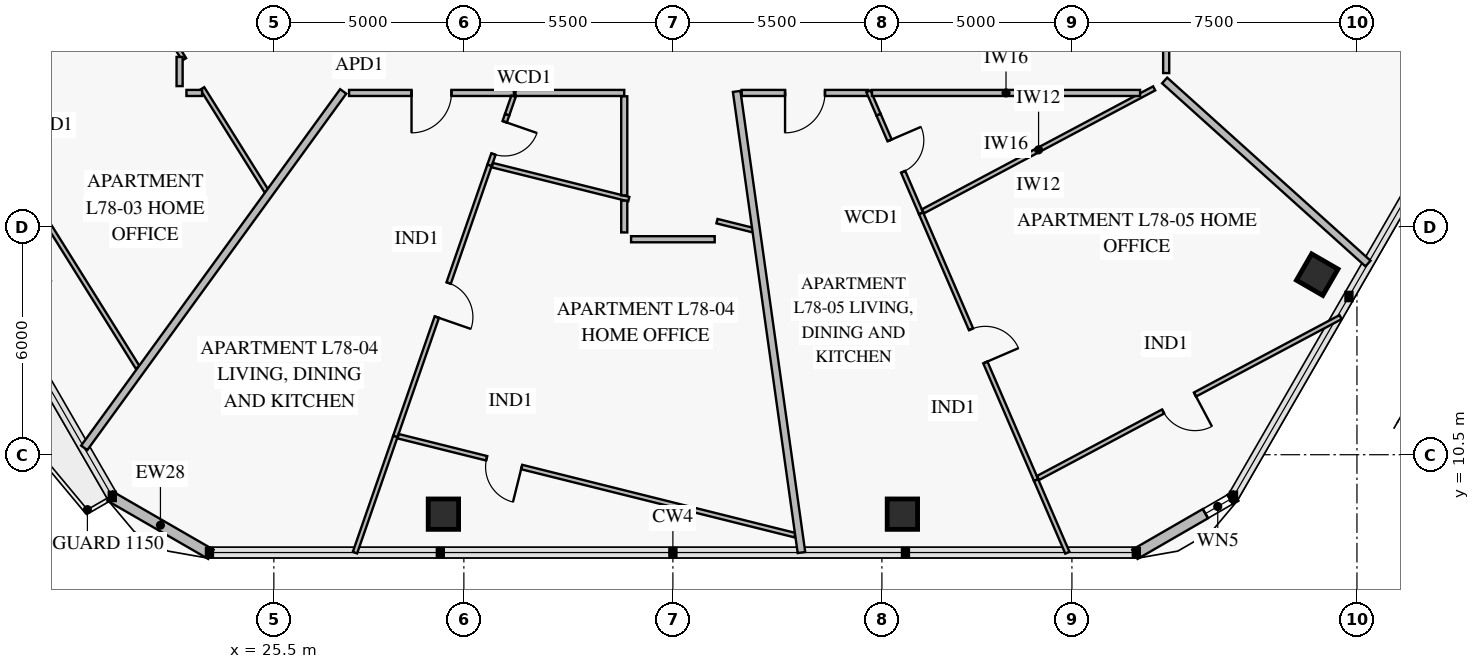
"""IFC4 building model, lengths in metres.
Left out: names, types, materials, properties, quantities, classifications, styles, units other than length and angle.
Written with IfcOpenShell. Run it as: python <this file> out.ifc"""

import sys

from ifc_helpers import new_model, si_unit, direction, frame, frame_2d, origin, origin_2d, place, context, subcontext, project, spatial, rectangle, extrude, element, fill, save


model = new_model("IFC4")
c1 = context("Model", 3, precision=1e-05, world=origin(), true_north=direction((0.0, 1.0)))
c2 = subcontext(c1, "Body", "Model", "MODEL_VIEW")
j1 = project(units=[si_unit("LENGTHUNIT", "METRE"), si_unit("PLANEANGLEUNIT", "RADIAN")], contexts=[c1])
p1 = place(None, origin())
s1 = spatial("IfcSite", under=j1, at=p1, CompositionType="ELEMENT")
p2 = place(p1, origin())
s2 = spatial("IfcBuilding", under=s1, at=p2, CompositionType="ELEMENT")
p3 = place(p2, frame((0.0, 0.0, 308.2)))
s3 = spatial("IfcBuildingStorey", under=s2, at=p3, CompositionType="ELEMENT", Elevation=308.2)
for number, where, z_axis, x_axis in (
    (1, (29.961, 8.936, 0.0), (0.0, 0.0, 1.0), (1.0, 0.0, 0.0)),
    (2, (42.039, 8.936, 0.0), (0.0, 0.0, 1.0), (1.0, 0.0, 0.0)),
    (3, (52.955, 15.238, 0.0), (0.0, 0.0, 1.0), (0.5, 0.866, 0.0)),
):
    element("IfcColumn", number, at=place(p3, frame(where, z_axis=z_axis, x_axis=x_axis)), inside=s3, PredefinedType="COLUMN", context=c2, shape_type="SweptSolid", body=[
        extrude(rectangle(XDim=0.8, YDim=0.8, at=origin_2d()), origin(), (0.0, 0.0, 1.0), 3.55),
    ])
p4 = place(p3, frame((50.811, 9.411, 0.0), z_axis=(0.0, 0.0, 1.0), x_axis=(-0.866023752521, -0.50000286006, 0.0)))
e4 = element("IfcWall", 4, at=p4, inside=s3, PredefinedType="SOLIDWALL", context=c2, shape_type="SweptSolid", body=[
    extrude(rectangle(XDim=3.065, YDim=0.28, at=frame_2d((1.532, 0.0))), origin(), (0.0, 0.0, 1.0), 3.55),
])
p5 = place(p4, frame((0.173, 0.0, 0.85)))
e5 = element("IfcOpeningElement", 5, at=p5, cuts=e4, PredefinedType="OPENING", context=c2, shape_type="SweptSolid", body=[
    extrude(rectangle(XDim=0.75, YDim=1.5, at=frame_2d((0.375, 0.75))), frame((0.0, 0.152, 0.0), z_axis=(0.0, -1.0, 0.0), x_axis=(1.0, 0.0, 0.0)), (0.0, 0.0, 1.0), 0.304),
])
p6 = place(p3, frame((23.843, 7.878, 0.0), z_axis=(0.0, 0.0, 1.0), x_axis=(-0.866023752521, 0.50000286006, 0.0)))
e6 = element("IfcWall", 6, at=p6, inside=s3, PredefinedType="SOLIDWALL", context=c2, shape_type="SweptSolid", body=[
    extrude(rectangle(XDim=3.065, YDim=0.28, at=frame_2d((1.532, 0.0))), origin(), (0.0, 0.0, 1.0), 3.55),
])
p7 = place(p3, frame((16.22, 21.915, 0.0), z_axis=(0.0, 0.0, 1.0), x_axis=(0.529909111027, -0.8480544405, 0.0)))
e7 = element("IfcWall", 7, at=p7, inside=s3, PredefinedType="PARTITIONING", context=c2, shape_type="SweptSolid", body=[
    extrude(rectangle(XDim=10.75, YDim=0.12, at=frame_2d((5.375, 0.0))), origin(), (0.0, 0.0, 1.0), 2.97),
])
p8 = place(p7, frame((4.815, 0.0, 0.0)))
e8 = element("IfcOpeningElement", 8, at=p8, cuts=e7, PredefinedType="OPENING", context=c2, shape_type="SweptSolid", body=[
    extrude(rectangle(XDim=0.95, YDim=2.1, at=frame_2d((0.475, 1.05))), frame((0.0, 0.072, 0.0), z_axis=(0.0, -1.0, 0.0), x_axis=(1.0, 0.0, 0.0)), (0.0, 0.0, 1.0), 0.144),
])
p9 = place(p3, frame((31.639, 19.45, 0.0), z_axis=(0.0, 0.0, 1.0), x_axis=(-0.328259686912, -0.944587517358, 0.0)))
e9 = element("IfcWall", 9, at=p9, inside=s3, PredefinedType="PARTITIONING", context=c2, shape_type="SweptSolid", body=[
    extrude(rectangle(XDim=1.415, YDim=0.12, at=frame_2d((0.708, 0.0))), origin(), (0.0, 0.0, 1.0), 3.55),
])
p10 = place(p9, frame((0.2, 0.0, 0.0)))
e10 = element("IfcOpeningElement", 10, at=p10, cuts=e9, PredefinedType="OPENING", context=c2, shape_type="SweptSolid", body=[
    extrude(rectangle(XDim=0.9, YDim=2.1, at=frame_2d((0.45, 1.05))), frame((0.0, 0.072, 0.0), z_axis=(0.0, -1.0, 0.0), x_axis=(1.0, 0.0, 0.0)), (0.0, 0.0, 1.0), 0.144),
])
p11 = place(p3, frame((31.175, 18.113, 0.0), z_axis=(0.0, 0.0, 1.0), x_axis=(-0.32822845585, -0.944598370087, 0.0)))
e11 = element("IfcWall", 11, at=p11, inside=s3, PredefinedType="PARTITIONING", context=c2, shape_type="SweptSolid", body=[
    extrude(rectangle(XDim=7.552, YDim=0.12, at=frame_2d((3.776, 0.0))), origin(), (0.0, 0.0, 1.0), 3.55),
])
p12 = place(p11, frame((3.276, 0.0, 0.0)))
e12 = element("IfcOpeningElement", 12, at=p12, cuts=e11, PredefinedType="OPENING", context=c2, shape_type="SweptSolid", body=[
    extrude(rectangle(XDim=0.95, YDim=2.1, at=frame_2d((0.475, 1.05))), frame((0.0, 0.072, 0.0), z_axis=(0.0, -1.0, 0.0), x_axis=(1.0, 0.0, 0.0)), (0.0, 0.0, 1.0), 0.144),
])
p13 = place(p3, frame((28.771, 10.987, 0.0), z_axis=(0.0, 0.0, 1.0), x_axis=(0.970295811895, -0.241921552202, 0.0)))
e13 = element("IfcWall", 13, at=p13, inside=s3, PredefinedType="PARTITIONING", context=c2, shape_type="SweptSolid", body=[
    extrude(rectangle(XDim=10.759, YDim=0.12, at=frame_2d((5.379, 0.0))), origin(), (0.0, 0.0, 1.0), 2.97),
])
p14 = place(p13, frame((2.4, 0.0, 0.0)))
e14 = element("IfcOpeningElement", 14, at=p14, cuts=e13, PredefinedType="OPENING", context=c2, shape_type="SweptSolid", body=[
    extrude(rectangle(XDim=0.95, YDim=2.1, at=frame_2d((0.475, 1.05))), frame((0.0, 0.072, 0.0), z_axis=(0.0, -1.0, 0.0), x_axis=(1.0, 0.0, 0.0)), (0.0, 0.0, 1.0), 0.144),
])
p15 = place(p3, frame((27.479, 20.02, 0.0), z_axis=(0.0, 0.0, 1.0), x_axis=(1.0, 0.0, 0.0)))
e15 = element("IfcWall", 15, at=p15, inside=s3, PredefinedType="PARTITIONING", context=c2, shape_type="SweptSolid", body=[
    extrude(rectangle(XDim=4.337, YDim=0.16, at=frame_2d((2.168, 0.0))), origin(), (0.0, 0.0, 1.0), 3.55),
])
p16 = place(p15, frame((1.644, 0.0, 0.0)))
e16 = element("IfcOpeningElement", 16, at=p16, cuts=e15, PredefinedType="OPENING", context=c2, shape_type="SweptSolid", body=[
    extrude(rectangle(XDim=1.05, YDim=2.15, at=frame_2d((0.525, 1.075))), frame((0.0, 0.092, 0.0), z_axis=(0.0, -1.0, 0.0), x_axis=(1.0, 0.0, 0.0)), (0.0, 0.0, 1.0), 0.184),
])
p17 = place(p3, frame((41.41, 19.45, 0.0), z_axis=(0.0, 0.0, 1.0), x_axis=(0.395844398044, -0.918317598948, 0.0)))
e17 = element("IfcWall", 17, at=p17, inside=s3, PredefinedType="PARTITIONING", context=c2, shape_type="SweptSolid", body=[
    extrude(rectangle(XDim=2.83, YDim=0.12, at=frame_2d((1.415, 0.0))), origin(), (0.0, 0.0, 1.0), 3.55),
])
p18 = place(p17, frame((0.739, 0.0, 0.0)))
e18 = element("IfcOpeningElement", 18, at=p18, cuts=e17, PredefinedType="OPENING", context=c2, shape_type="SweptSolid", body=[
    extrude(rectangle(XDim=0.9, YDim=2.1, at=frame_2d((0.45, 1.05))), frame((0.0, 0.072, 0.0), z_axis=(0.0, -1.0, 0.0), x_axis=(1.0, 0.0, 0.0)), (0.0, 0.0, 1.0), 0.144),
])
p19 = place(p3, frame((42.531, 16.851, 0.0), z_axis=(0.0, 0.0, 1.0), x_axis=(0.39587300587, -0.918305266904, 0.0)))
e19 = element("IfcWall", 19, at=p19, inside=s3, PredefinedType="PARTITIONING", context=c2, shape_type="SweptSolid", body=[
    extrude(rectangle(XDim=7.643, YDim=0.12, at=frame_2d((3.821, 0.0))), origin(), (0.0, 0.0, 1.0), 2.97),
])
p20 = place(p19, frame((3.322, 0.0, 0.0)))
e20 = element("IfcOpeningElement", 20, at=p20, cuts=e19, PredefinedType="OPENING", context=c2, shape_type="SweptSolid", body=[
    extrude(rectangle(XDim=0.95, YDim=2.1, at=frame_2d((0.475, 1.05))), frame((0.0, 0.072, 0.0), z_axis=(0.0, -1.0, 0.0), x_axis=(1.0, 0.0, 0.0)), (0.0, 0.0, 1.0), 0.144),
])
p21 = place(p3, frame((45.607, 9.887, 0.0), z_axis=(0.0, 0.0, 1.0), x_axis=(0.882942125216, 0.469481845782, 0.0)))
e21 = element("IfcWall", 21, at=p21, inside=s3, PredefinedType="PARTITIONING", context=c2, shape_type="SweptSolid", body=[
    extrude(rectangle(XDim=9.017, YDim=0.12, at=frame_2d((4.508, 0.0))), origin(), (0.0, 0.0, 1.0), 3.55),
])
p22 = place(p21, frame((3.729, 0.0, 0.0)))
e22 = element("IfcOpeningElement", 22, at=p22, cuts=e21, PredefinedType="OPENING", context=c2, shape_type="SweptSolid", body=[
    extrude(rectangle(XDim=0.95, YDim=2.1, at=frame_2d((0.475, 1.05))), frame((0.0, 0.072, 0.0), z_axis=(0.0, -1.0, 0.0), x_axis=(1.0, 0.0, 0.0)), (0.0, 0.0, 1.0), 0.144),
])
p23 = place(p3, frame((37.811, 20.02, 0.0), z_axis=(0.0, 0.0, 1.0), x_axis=(1.0, 0.0, 0.0)))
e23 = element("IfcWall", 23, at=p23, inside=s3, PredefinedType="PARTITIONING", context=c2, shape_type="SweptSolid", body=[
    extrude(rectangle(XDim=3.332, YDim=0.16, at=frame_2d((1.666, 0.0))), origin(), (0.0, 0.0, 1.0), 3.0),
])
p24 = place(p23, frame((1.141, 0.0, 0.0)))
e24 = element("IfcOpeningElement", 24, at=p24, cuts=e23, PredefinedType="OPENING", context=c2, shape_type="SweptSolid", body=[
    extrude(rectangle(XDim=1.05, YDim=2.15, at=frame_2d((0.525, 1.075))), frame((0.0, 0.092, 0.0), z_axis=(0.0, -1.0, 0.0), x_axis=(1.0, 0.0, 0.0)), (0.0, 0.0, 1.0), 0.184),
])
p25 = place(p3, frame((20.998, 24.333, 0.0), z_axis=(0.0, 0.0, 1.0), x_axis=(0.529874080143, -0.848076328636, 0.0)))
e25 = element("IfcWall", 25, at=p25, inside=s3, PredefinedType="PARTITIONING", context=c2, shape_type="SweptSolid", body=[
    extrude(rectangle(XDim=4.043, YDim=0.12, at=frame_2d((2.021, 0.0))), origin(), (0.0, 0.0, 1.0), 3.55),
])
p26 = place(p3, frame((23.617, 20.14, 0.0), z_axis=(0.0, 0.0, 1.0), x_axis=(0.529937667558, -0.848036596205, 0.0)))
e26 = element("IfcWall", 26, at=p26, inside=s3, PredefinedType="PARTITIONING", context=c2, shape_type="SweptSolid", body=[
    extrude(rectangle(XDim=3.223, YDim=0.12, at=frame_2d((1.612, 0.0))), origin(), (0.0, 0.0, 1.0), 3.0),
])
p27 = place(p3, frame((27.325, 20.06, 0.0), z_axis=(0.0, 0.0, 1.0), x_axis=(-0.587784737056, -0.809017368716, 0.0)))
e27 = element("IfcWall", 27, at=p27, inside=s3, PredefinedType="PARTITIONING", context=c2, shape_type="SweptSolid", body=[
    extrude(rectangle(XDim=11.594, YDim=0.2, at=frame_2d((5.797, 0.0))), origin(), (0.0, 0.0, 1.0), 2.97),
])
p28 = place(p3, frame((31.807, 19.932, 0.0), z_axis=(0.0, 0.0, 1.0), x_axis=(-0.328260778463, -0.944587138025, 0.0)))
e28 = element("IfcWall", 28, at=p28, inside=s3, PredefinedType="PARTITIONING", context=c2, shape_type="SweptSolid", body=[
    extrude(rectangle(XDim=0.51, YDim=0.12, at=frame_2d((0.255, 0.0))), origin(), (0.0, 0.0, 1.0), 3.55),
])
p29 = place(p3, frame((28.696, 10.979, 0.0), z_axis=(0.0, 0.0, 1.0), x_axis=(-0.328219248411, -0.944601569432, 0.0)))
e29 = element("IfcWall", 29, at=p29, inside=s3, PredefinedType="PARTITIONING", context=c2, shape_type="SweptSolid", body=[
    extrude(rectangle(XDim=3.236, YDim=0.12, at=frame_2d((1.618, 0.0))), origin(), (0.0, 0.0, 1.0), 2.97),
])
p30 = place(p3, frame((31.249, 18.12, 0.0), z_axis=(0.0, 0.0, 1.0), x_axis=(0.970297526706, -0.241914674356, 0.0)))
e30 = element("IfcWall", 30, at=p30, inside=s3, PredefinedType="PARTITIONING", context=c2, shape_type="SweptSolid", body=[
    extrude(rectangle(XDim=3.701, YDim=0.12, at=frame_2d((1.85, 0.0))), origin(), (0.0, 0.0, 1.0), 3.0),
])
p31 = place(p3, frame((37.16, 16.646, 0.0), z_axis=(0.0, 0.0, 1.0), x_axis=(0.970296375277, -0.241919292584, 0.0)))
e31 = element("IfcWall", 31, at=p31, inside=s3, PredefinedType="PARTITIONING", context=c2, shape_type="SweptSolid", body=[
    extrude(rectangle(XDim=1.025, YDim=0.12, at=frame_2d((0.513, 0.0))), origin(), (0.0, 0.0, 1.0), 3.55),
])
p32 = place(p3, frame((37.678, 20.06, 0.0), z_axis=(0.0, 0.0, 1.0), x_axis=(0.139169963781, -0.990268509638, 0.0)))
e32 = element("IfcWall", 32, at=p32, inside=s3, PredefinedType="PARTITIONING", context=c2, shape_type="SweptSolid", body=[
    extrude(rectangle(XDim=12.253, YDim=0.2, at=frame_2d((6.127, 0.0))), origin(), (0.0, 0.0, 1.0), 2.97),
])
p33 = place(p3, frame((41.146, 20.063, 0.0), z_axis=(0.0, 0.0, 1.0), x_axis=(0.395728306554, -0.918367631938, 0.0)))
e33 = element("IfcWall", 33, at=p33, inside=s3, PredefinedType="PARTITIONING", context=c2, shape_type="SweptSolid", body=[
    extrude(rectangle(XDim=0.667, YDim=0.12, at=frame_2d((0.334, 0.0))), origin(), (0.0, 0.0, 1.0), 3.55),
])
p34 = place(p3, frame((45.556, 9.832, 0.0), z_axis=(0.0, 0.0, 1.0), x_axis=(0.39587198398, -0.918305707431, 0.0)))
e34 = element("IfcWall", 34, at=p34, inside=s3, PredefinedType="PARTITIONING", context=c2, shape_type="SweptSolid", body=[
    extrude(rectangle(XDim=2.081, YDim=0.12, at=frame_2d((1.041, 0.0))), origin(), (0.0, 0.0, 1.0), 3.55),
])
p35 = place(p3, frame((42.581, 16.906, 0.0), z_axis=(0.0, 0.0, 1.0), x_axis=(0.882955532535, 0.469456630122, 0.0)))
e35 = element("IfcWall", 35, at=p35, inside=s3, PredefinedType="PARTITIONING", context=c2, shape_type="SweptSolid", body=[
    extrude(rectangle(XDim=6.889, YDim=0.12, at=frame_2d((3.445, 0.0))), origin(), (0.0, 0.0, 1.0), 3.0),
])
p36 = place(p3, frame((48.94, 20.349, 0.0), z_axis=(0.0, 0.0, 1.0), x_axis=(0.74315080538, -0.669123964944, 0.0)))
e36 = element("IfcWall", 36, at=p36, inside=s3, PredefinedType="PARTITIONING", context=c2, shape_type="SweptSolid", body=[
    extrude(rectangle(XDim=7.199, YDim=0.2, at=frame_2d((3.6, 0.0))), origin(), (0.0, 0.0, 1.0), 2.97),
])
p37 = place(p3, frame((23.02, 20.968, 0.0), z_axis=(0.0, 0.0, 1.0), x_axis=(0.0, -1.0, 0.0)))
e37 = element("IfcWall", 37, at=p37, inside=s3, PredefinedType="PARTITIONING", context=c2, shape_type="SweptSolid", body=[
    extrude(rectangle(XDim=0.768, YDim=0.16, at=frame_2d((0.384, 0.0))), origin(), (0.0, 0.0, 1.0), 3.55),
])
p38 = place(p3, frame((23.2, 20.02, 0.0), z_axis=(0.0, 0.0, 1.0), x_axis=(1.0, 0.0, 0.0)))
e38 = element("IfcWall", 38, at=p38, inside=s3, PredefinedType="PARTITIONING", context=c2, shape_type="SweptSolid", body=[
    extrude(rectangle(XDim=0.412, YDim=0.16, at=frame_2d((0.206, 0.0))), origin(), (0.0, 0.0, 1.0), 3.55),
])
p39 = place(p3, frame((31.859, 20.02, 0.0), z_axis=(0.0, 0.0, 1.0), x_axis=(1.0, 0.0, 0.0)))
e39 = element("IfcWall", 39, at=p39, inside=s3, PredefinedType="PARTITIONING", context=c2, shape_type="SweptSolid", body=[
    extrude(rectangle(XDim=2.861, YDim=0.16, at=frame_2d((1.431, 0.0))), origin(), (0.0, 0.0, 1.0), 3.0),
])
p40 = place(p3, frame((34.72, 19.932, 0.0), z_axis=(0.0, 0.0, 1.0), x_axis=(0.0, -1.0, 0.0)))
e40 = element("IfcWall", 40, at=p40, inside=s3, PredefinedType="PARTITIONING", context=c2, shape_type="SweptSolid", body=[
    extrude(rectangle(XDim=2.607, YDim=0.16, at=frame_2d((1.303, 0.0))), origin(), (0.0, 0.0, 1.0), 3.55),
])
p41 = place(p3, frame((34.9, 16.17, 0.0), z_axis=(0.0, 0.0, 1.0), x_axis=(1.0, 0.0, 0.0)))
e41 = element("IfcWall", 41, at=p41, inside=s3, PredefinedType="PARTITIONING", context=c2, shape_type="SweptSolid", body=[
    extrude(rectangle(XDim=2.2, YDim=0.16, at=frame_2d((1.1, 0.0))), origin(), (0.0, 0.0, 1.0), 3.55),
])
p42 = place(p3, frame((34.72, 17.185, 0.0), z_axis=(0.0, 0.0, 1.0), x_axis=(0.0, -1.0, 0.0)))
e42 = element("IfcWall", 42, at=p42, inside=s3, PredefinedType="PARTITIONING", context=c2, shape_type="SweptSolid", body=[
    extrude(rectangle(XDim=0.835, YDim=0.16, at=frame_2d((0.417, 0.0))), origin(), (0.0, 0.0, 1.0), 3.55),
])
p43 = place(p3, frame((41.238, 20.02, 0.0), z_axis=(0.0, 0.0, 1.0), x_axis=(1.0, 0.0, 0.0)))
e43 = element("IfcWall", 43, at=p43, inside=s3, PredefinedType="PARTITIONING", context=c2, shape_type="SweptSolid", body=[
    extrude(rectangle(XDim=7.055, YDim=0.16, at=frame_2d((3.527, 0.0))), origin(), (0.0, 0.0, 1.0), 3.0),
])
p44 = place(p3, frame((48.98, 20.543, 0.0), z_axis=(0.0, 0.0, 1.0), x_axis=(0.0, 1.0, 0.0)))
e44 = element("IfcWall", 44, at=p44, inside=s3, PredefinedType="PARTITIONING", context=c2, shape_type="SweptSolid", body=[
    extrude(rectangle(XDim=1.707, YDim=0.16, at=frame_2d((0.854, 0.0))), origin(), (0.0, 0.0, 1.0), 3.55),
])
p45 = place(p5, origin())
e45 = element("IfcWindow", 45, at=p45, inside=s3, PartitioningType="SINGLE_PANEL", PredefinedType="WINDOW", context=c2, shape_type="SweptSolid", body=[
    extrude(rectangle(XDim=0.75, YDim=1.5, at=frame_2d((0.375, 0.75))), frame((0.0, 0.03, 0.0), z_axis=(0.0, -1.0, 0.0), x_axis=(1.0, 0.0, 0.0)), (0.0, 0.0, 1.0), 0.06),
])
fill(e5, e45)
p46 = place(p10, origin())
e46 = element("IfcDoor", 46, at=p46, inside=s3, OperationType="SINGLE_SWING_LEFT", PredefinedType="DOOR", context=c2, shape_type="SweptSolid", body=[
    extrude(rectangle(XDim=0.9, YDim=2.1, at=frame_2d((0.45, 1.05))), frame((0.0, 0.025, 0.0), z_axis=(0.0, -1.0, 0.0), x_axis=(1.0, 0.0, 0.0)), (0.0, 0.0, 1.0), 0.05),
])
fill(e10, e46)
p47 = place(p12, origin())
e47 = element("IfcDoor", 47, at=p47, inside=s3, OperationType="SINGLE_SWING_RIGHT", PredefinedType="DOOR", context=c2, shape_type="SweptSolid", body=[
    extrude(rectangle(XDim=0.95, YDim=2.1, at=frame_2d((0.475, 1.05))), frame((0.0, 0.025, 0.0), z_axis=(0.0, -1.0, 0.0), x_axis=(1.0, 0.0, 0.0)), (0.0, 0.0, 1.0), 0.05),
])
fill(e12, e47)
p48 = place(p14, frame((0.95, 0.0, 0.0), z_axis=(0.0, 0.0, 1.0), x_axis=(-1.0, 0.0, 0.0)))
e48 = element("IfcDoor", 48, at=p48, inside=s3, OperationType="SINGLE_SWING_LEFT", PredefinedType="DOOR", context=c2, shape_type="SweptSolid", body=[
    extrude(rectangle(XDim=0.95, YDim=2.1, at=frame_2d((0.475, 1.05))), frame((0.0, 0.025, 0.0), z_axis=(0.0, -1.0, 0.0), x_axis=(1.0, 0.0, 0.0)), (0.0, 0.0, 1.0), 0.05),
])
fill(e14, e48)
p49 = place(p16, frame((1.05, 0.0, 0.0), z_axis=(0.0, 0.0, 1.0), x_axis=(-1.0, 0.0, 0.0)))
e49 = element("IfcDoor", 49, at=p49, inside=s3, OperationType="SINGLE_SWING_RIGHT", PredefinedType="DOOR", context=c2, shape_type="SweptSolid", body=[
    extrude(rectangle(XDim=1.05, YDim=2.15, at=frame_2d((0.525, 1.075))), frame((0.0, 0.025, 0.0), z_axis=(0.0, -1.0, 0.0), x_axis=(1.0, 0.0, 0.0)), (0.0, 0.0, 1.0), 0.05),
])
fill(e16, e49)
p50 = place(p18, origin())
e50 = element("IfcDoor", 50, at=p50, inside=s3, OperationType="SINGLE_SWING_LEFT", PredefinedType="DOOR", context=c2, shape_type="SweptSolid", body=[
    extrude(rectangle(XDim=0.9, YDim=2.1, at=frame_2d((0.45, 1.05))), frame((0.0, 0.025, 0.0), z_axis=(0.0, -1.0, 0.0), x_axis=(1.0, 0.0, 0.0)), (0.0, 0.0, 1.0), 0.05),
])
fill(e18, e50)
p51 = place(p20, origin())
e51 = element("IfcDoor", 51, at=p51, inside=s3, OperationType="SINGLE_SWING_RIGHT", PredefinedType="DOOR", context=c2, shape_type="SweptSolid", body=[
    extrude(rectangle(XDim=0.95, YDim=2.1, at=frame_2d((0.475, 1.05))), frame((0.0, 0.025, 0.0), z_axis=(0.0, -1.0, 0.0), x_axis=(1.0, 0.0, 0.0)), (0.0, 0.0, 1.0), 0.05),
])
fill(e20, e51)
p52 = place(p22, frame((0.95, 0.0, 0.0), z_axis=(0.0, 0.0, 1.0), x_axis=(-1.0, 0.0, 0.0)))
e52 = element("IfcDoor", 52, at=p52, inside=s3, OperationType="SINGLE_SWING_LEFT", PredefinedType="DOOR", context=c2, shape_type="SweptSolid", body=[
    extrude(rectangle(XDim=0.95, YDim=2.1, at=frame_2d((0.475, 1.05))), frame((0.0, 0.025, 0.0), z_axis=(0.0, -1.0, 0.0), x_axis=(1.0, 0.0, 0.0)), (0.0, 0.0, 1.0), 0.05),
])
fill(e22, e52)
p53 = place(p24, frame((1.05, 0.0, 0.0), z_axis=(0.0, 0.0, 1.0), x_axis=(-1.0, 0.0, 0.0)))
e53 = element("IfcDoor", 53, at=p53, inside=s3, OperationType="SINGLE_SWING_RIGHT", PredefinedType="DOOR", context=c2, shape_type="SweptSolid", body=[
    extrude(rectangle(XDim=1.05, YDim=2.15, at=frame_2d((0.525, 1.075))), frame((0.0, 0.025, 0.0), z_axis=(0.0, -1.0, 0.0), x_axis=(1.0, 0.0, 0.0)), (0.0, 0.0, 1.0), 0.05),
])
fill(e24, e53)
save(model, sys.argv[1])
